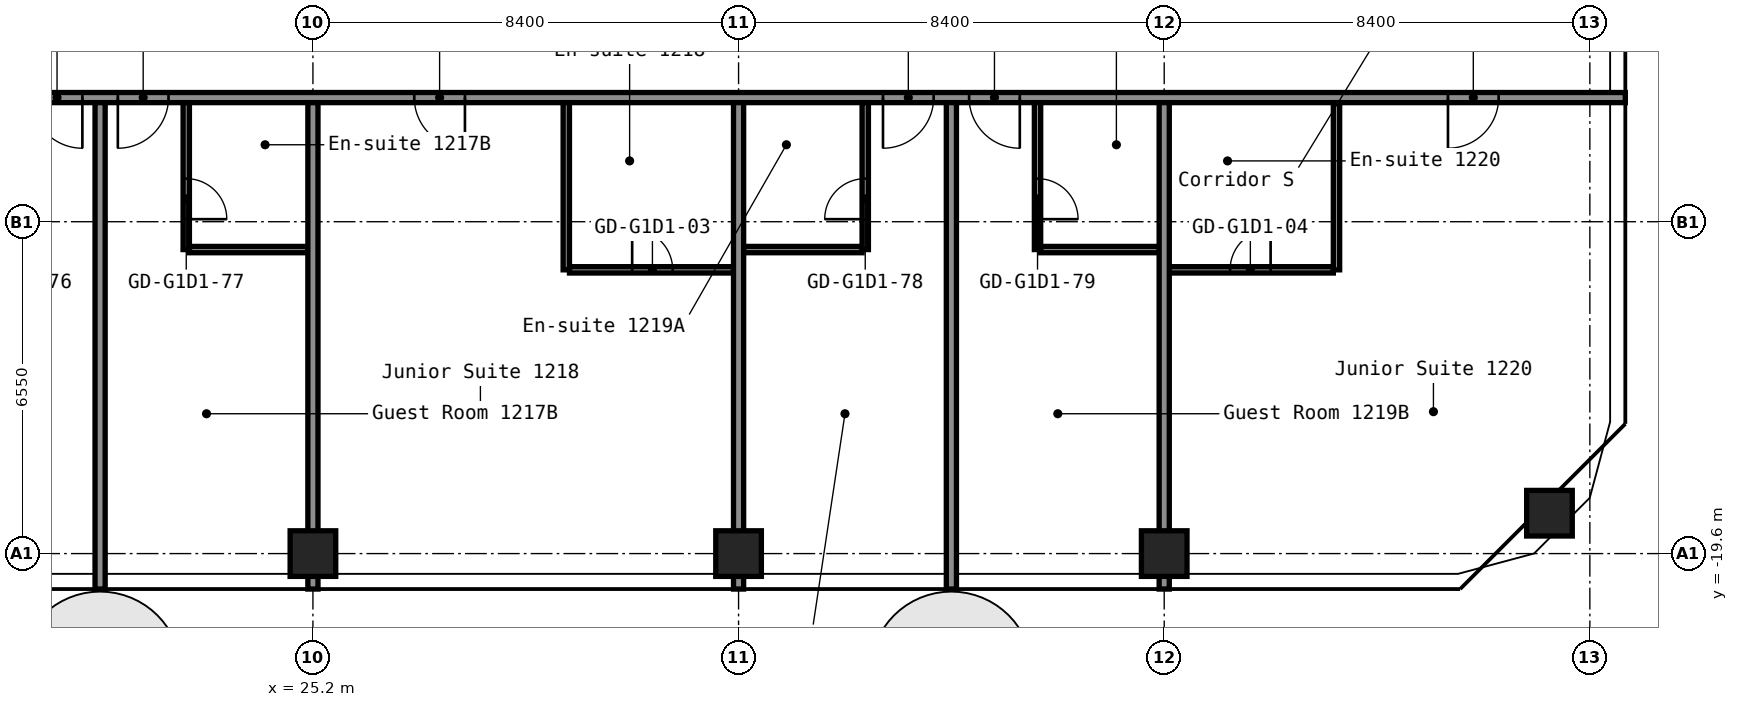
"""IFC4 building model, lengths in metres.
Left out: names, types, materials, properties, quantities, classifications, styles, units other than length and angle.
Written with IfcOpenShell. Run it as: python <this file> out.ifc"""

import sys

from ifc_helpers import new_model, si_unit, direction, frame, frame_2d, origin, origin_2d, place, context, subcontext, project, spatial, rectangle, hollow_rectangle, extrude, element, fill, save


model = new_model("IFC4")
c1 = context("Model", 3, precision=1e-05, world=origin(), true_north=direction((0.0, 1.0)))
c2 = subcontext(c1, "Body", "Model", "MODEL_VIEW")
j1 = project(units=[si_unit("LENGTHUNIT", "METRE"), si_unit("PLANEANGLEUNIT", "RADIAN")], contexts=[c1])
p1 = place(None, origin())
s1 = spatial("IfcSite", under=j1, at=p1, CompositionType="ELEMENT")
p2 = place(p1, origin())
s2 = spatial("IfcBuilding", under=s1, at=p2, CompositionType="ELEMENT")
p3 = place(p2, frame((0.0, 0.0, 45.4)))
s3 = spatial("IfcBuildingStorey", under=s2, at=p3, CompositionType="ELEMENT", Elevation=45.4)
for number, where, z_axis, x_axis in (
    (1, (25.2, -19.6, 0.0), (0.0, 0.0, 1.0), (1.0, 0.0, 0.0)),
    (2, (33.6, -19.6, 0.0), (0.0, 0.0, 1.0), (1.0, 0.0, 0.0)),
    (3, (42.0, -19.6, 0.0), (0.0, 0.0, 1.0), (1.0, 0.0, 0.0)),
    (4, (49.603, -18.803, 0.0), (0.0, 0.0, 1.0), (1.0, 0.0, 0.0)),
):
    element("IfcColumn", number, at=place(p3, frame(where, z_axis=z_axis, x_axis=x_axis)), inside=s3, PredefinedType="COLUMN", context=c2, shape_type="SweptSolid", body=[
        extrude(hollow_rectangle(XDim=0.9, YDim=0.9, WallThickness=0.036, at=origin_2d()), origin(), (0.0, 0.0, 1.0), 2.8),
    ])
p4 = place(p3, frame((30.262, -14.0, 0.0), z_axis=(0.0, 0.0, 1.0), x_axis=(1.0, 0.0, 0.0)))
e5 = element("IfcWall", 5, at=p4, inside=s3, PredefinedType="PARTITIONING", context=c2, shape_type="SweptSolid", body=[
    extrude(rectangle(XDim=3.238, YDim=0.125, at=frame_2d((1.619, 0.0))), origin(), (0.0, 0.0, 1.0), 2.8),
])
p5 = place(p4, frame((1.238, 0.0, 0.0)))
e6 = element("IfcOpeningElement", 6, at=p5, cuts=e5, PredefinedType="OPENING", context=c2, shape_type="SweptSolid", body=[
    extrude(rectangle(XDim=0.8, YDim=2.1, at=frame_2d((0.4, 1.05))), frame((0.0, 0.073, 0.0), z_axis=(0.0, -1.0, 0.0), x_axis=(1.0, 0.0, 0.0)), (0.0, 0.0, 1.0), 0.145),
])
p6 = place(p3, frame((42.1, -14.0, 0.0), z_axis=(0.0, 0.0, 1.0), x_axis=(1.0, 0.0, 0.0)))
e7 = element("IfcWall", 7, at=p6, inside=s3, PredefinedType="PARTITIONING", context=c2, shape_type="SweptSolid", body=[
    extrude(rectangle(XDim=3.237, YDim=0.125, at=frame_2d((1.619, 0.0))), origin(), (0.0, 0.0, 1.0), 2.8),
])
p7 = place(p6, frame((1.2, 0.0, 0.0)))
e8 = element("IfcOpeningElement", 8, at=p7, cuts=e7, PredefinedType="OPENING", context=c2, shape_type="SweptSolid", body=[
    extrude(rectangle(XDim=0.8, YDim=2.1, at=frame_2d((0.4, 1.05))), frame((0.0, 0.073, 0.0), z_axis=(0.0, -1.0, 0.0), x_axis=(1.0, 0.0, 0.0)), (0.0, 0.0, 1.0), 0.145),
])
for number, where, z_axis, x_axis in (
    (9, (22.762, -13.6, 0.0), (0.0, 0.0, 1.0), (1.0, 0.0, 0.0)),
    (10, (33.7, -13.6, 0.0), (0.0, 0.0, 1.0), (1.0, 0.0, 0.0)),
):
    element("IfcWall", number, at=place(p3, frame(where, z_axis=z_axis, x_axis=x_axis)), inside=s3, PredefinedType="PARTITIONING", context=c2, shape_type="SweptSolid", body=[
        extrude(rectangle(XDim=2.338, YDim=0.125, at=frame_2d((1.169, 0.0))), origin(), (0.0, 0.0, 1.0), 2.8),
    ])
p8 = place(p3, frame((39.562, -13.6, 0.0), z_axis=(0.0, 0.0, 1.0), x_axis=(1.0, 0.0, 0.0)))
e11 = element("IfcWall", 11, at=p8, inside=s3, PredefinedType="PARTITIONING", context=c2, shape_type="SweptSolid", body=[
    extrude(rectangle(XDim=2.337, YDim=0.125, at=frame_2d((1.169, 0.0))), origin(), (0.0, 0.0, 1.0), 2.8),
])
p9 = place(p3, frame((16.8, -10.6, 0.0), z_axis=(0.0, 0.0, 1.0), x_axis=(1.0, 0.0, 0.0)))
e12 = element("IfcWall", 12, at=p9, inside=s3, PredefinedType="PARTITIONING", context=c2, shape_type="SweptSolid", body=[
    extrude(rectangle(XDim=34.3, YDim=0.2, at=frame_2d((17.15, 0.0))), origin(), (0.0, 0.0, 1.0), 2.8),
])
p10 = place(p9, frame((2.85, 0.0, 0.0)))
e13 = element("IfcOpeningElement", 13, at=p10, cuts=e12, PredefinedType="OPENING", context=c2, shape_type="SweptSolid", body=[
    extrude(rectangle(XDim=1.0, YDim=2.1, at=frame_2d((0.5, 1.05))), frame((0.0, 0.11, 0.0), z_axis=(0.0, -1.0, 0.0), x_axis=(1.0, 0.0, 0.0)), (0.0, 0.0, 1.0), 0.22),
])
p11 = place(p9, frame((4.55, 0.0, 0.0)))
e14 = element("IfcOpeningElement", 14, at=p11, cuts=e12, PredefinedType="OPENING", context=c2, shape_type="SweptSolid", body=[
    extrude(rectangle(XDim=1.0, YDim=2.1, at=frame_2d((0.5, 1.05))), frame((0.0, 0.11, 0.0), z_axis=(0.0, -1.0, 0.0), x_axis=(1.0, 0.0, 0.0)), (0.0, 0.0, 1.0), 0.22),
])
p12 = place(p9, frame((10.4, 0.0, 0.0)))
e15 = element("IfcOpeningElement", 15, at=p12, cuts=e12, PredefinedType="OPENING", context=c2, shape_type="SweptSolid", body=[
    extrude(rectangle(XDim=1.0, YDim=2.1, at=frame_2d((0.5, 1.05))), frame((0.0, 0.11, 0.0), z_axis=(0.0, -1.0, 0.0), x_axis=(1.0, 0.0, 0.0)), (0.0, 0.0, 1.0), 0.22),
])
p13 = place(p9, frame((19.65, 0.0, 0.0)))
e16 = element("IfcOpeningElement", 16, at=p13, cuts=e12, PredefinedType="OPENING", context=c2, shape_type="SweptSolid", body=[
    extrude(rectangle(XDim=1.0, YDim=2.1, at=frame_2d((0.5, 1.05))), frame((0.0, 0.11, 0.0), z_axis=(0.0, -1.0, 0.0), x_axis=(1.0, 0.0, 0.0)), (0.0, 0.0, 1.0), 0.22),
])
p14 = place(p9, frame((21.35, 0.0, 0.0)))
e17 = element("IfcOpeningElement", 17, at=p14, cuts=e12, PredefinedType="OPENING", context=c2, shape_type="SweptSolid", body=[
    extrude(rectangle(XDim=1.0, YDim=2.1, at=frame_2d((0.5, 1.05))), frame((0.0, 0.11, 0.0), z_axis=(0.0, -1.0, 0.0), x_axis=(1.0, 0.0, 0.0)), (0.0, 0.0, 1.0), 0.22),
])
p15 = place(p9, frame((30.8, 0.0, 0.0)))
e18 = element("IfcOpeningElement", 18, at=p15, cuts=e12, PredefinedType="OPENING", context=c2, shape_type="SweptSolid", body=[
    extrude(rectangle(XDim=1.0, YDim=2.1, at=frame_2d((0.5, 1.05))), frame((0.0, 0.11, 0.0), z_axis=(0.0, -1.0, 0.0), x_axis=(1.0, 0.0, 0.0)), (0.0, 0.0, 1.0), 0.22),
])
p16 = place(p3, frame((21.0, -20.3, 0.0), z_axis=(0.0, 0.0, 1.0), x_axis=(0.0, 1.0, 0.0)))
e19 = element("IfcWall", 19, at=p16, inside=s3, PredefinedType="PARTITIONING", context=c2, shape_type="SweptSolid", body=[
    extrude(rectangle(XDim=9.6, YDim=0.2, at=frame_2d((4.8, 0.0))), origin(), (0.0, 0.0, 1.0), 2.8),
])
p17 = place(p3, frame((22.7, -13.6, 0.0), z_axis=(0.0, 0.0, 1.0), x_axis=(0.0, 1.0, 0.0)))
e20 = element("IfcWall", 20, at=p17, inside=s3, PredefinedType="PARTITIONING", context=c2, shape_type="SweptSolid", body=[
    extrude(rectangle(XDim=2.9, YDim=0.125, at=frame_2d((1.45, 0.0))), origin(), (0.0, 0.0, 1.0), 2.8),
])
p18 = place(p17, frame((0.6, 0.0, 0.0)))
e21 = element("IfcOpeningElement", 21, at=p18, cuts=e20, PredefinedType="OPENING", context=c2, shape_type="SweptSolid", body=[
    extrude(rectangle(XDim=0.8, YDim=2.1, at=frame_2d((0.4, 1.05))), frame((0.0, 0.073, 0.0), z_axis=(0.0, -1.0, 0.0), x_axis=(1.0, 0.0, 0.0)), (0.0, 0.0, 1.0), 0.145),
])
p19 = place(p3, frame((25.2, -20.3, 0.0), z_axis=(0.0, 0.0, 1.0), x_axis=(0.0, 1.0, 0.0)))
e22 = element("IfcWall", 22, at=p19, inside=s3, PredefinedType="PARTITIONING", context=c2, shape_type="SweptSolid", body=[
    extrude(rectangle(XDim=9.6, YDim=0.2, at=frame_2d((4.8, 0.0))), origin(), (0.0, 0.0, 1.0), 2.8),
])
p20 = place(p3, frame((30.2, -14.0, 0.0), z_axis=(0.0, 0.0, 1.0), x_axis=(0.0, 1.0, 0.0)))
e23 = element("IfcWall", 23, at=p20, inside=s3, PredefinedType="PARTITIONING", context=c2, shape_type="SweptSolid", body=[
    extrude(rectangle(XDim=3.3, YDim=0.125, at=frame_2d((1.65, 0.0))), origin(), (0.0, 0.0, 1.0), 2.8),
])
p21 = place(p3, frame((33.6, -20.3, 0.0), z_axis=(0.0, 0.0, 1.0), x_axis=(0.0, 1.0, 0.0)))
e24 = element("IfcWall", 24, at=p21, inside=s3, PredefinedType="PARTITIONING", context=c2, shape_type="SweptSolid", body=[
    extrude(rectangle(XDim=9.6, YDim=0.2, at=frame_2d((4.8, 0.0))), origin(), (0.0, 0.0, 1.0), 2.8),
])
p22 = place(p3, frame((36.1, -13.6, 0.0), z_axis=(0.0, 0.0, 1.0), x_axis=(0.0, 1.0, 0.0)))
e25 = element("IfcWall", 25, at=p22, inside=s3, PredefinedType="PARTITIONING", context=c2, shape_type="SweptSolid", body=[
    extrude(rectangle(XDim=2.9, YDim=0.125, at=frame_2d((1.45, 0.0))), origin(), (0.0, 0.0, 1.0), 2.8),
])
p23 = place(p22, frame((0.6, 0.0, 0.0)))
e26 = element("IfcOpeningElement", 26, at=p23, cuts=e25, PredefinedType="OPENING", context=c2, shape_type="SweptSolid", body=[
    extrude(rectangle(XDim=0.8, YDim=2.1, at=frame_2d((0.4, 1.05))), frame((0.0, 0.073, 0.0), z_axis=(0.0, -1.0, 0.0), x_axis=(1.0, 0.0, 0.0)), (0.0, 0.0, 1.0), 0.145),
])
p24 = place(p3, frame((37.8, -20.3, 0.0), z_axis=(0.0, 0.0, 1.0), x_axis=(0.0, 1.0, 0.0)))
e27 = element("IfcWall", 27, at=p24, inside=s3, PredefinedType="PARTITIONING", context=c2, shape_type="SweptSolid", body=[
    extrude(rectangle(XDim=9.6, YDim=0.2, at=frame_2d((4.8, 0.0))), origin(), (0.0, 0.0, 1.0), 2.8),
])
p25 = place(p3, frame((39.5, -13.6, 0.0), z_axis=(0.0, 0.0, 1.0), x_axis=(0.0, 1.0, 0.0)))
e28 = element("IfcWall", 28, at=p25, inside=s3, PredefinedType="PARTITIONING", context=c2, shape_type="SweptSolid", body=[
    extrude(rectangle(XDim=2.9, YDim=0.125, at=frame_2d((1.45, 0.0))), origin(), (0.0, 0.0, 1.0), 2.8),
])
p26 = place(p25, frame((0.6, 0.0, 0.0)))
e29 = element("IfcOpeningElement", 29, at=p26, cuts=e28, PredefinedType="OPENING", context=c2, shape_type="SweptSolid", body=[
    extrude(rectangle(XDim=0.8, YDim=2.1, at=frame_2d((0.4, 1.05))), frame((0.0, 0.073, 0.0), z_axis=(0.0, -1.0, 0.0), x_axis=(1.0, 0.0, 0.0)), (0.0, 0.0, 1.0), 0.145),
])
p27 = place(p3, frame((42.0, -20.3, 0.0), z_axis=(0.0, 0.0, 1.0), x_axis=(0.0, 1.0, 0.0)))
e30 = element("IfcWall", 30, at=p27, inside=s3, PredefinedType="PARTITIONING", context=c2, shape_type="SweptSolid", body=[
    extrude(rectangle(XDim=9.6, YDim=0.2, at=frame_2d((4.8, 0.0))), origin(), (0.0, 0.0, 1.0), 2.8),
])
p28 = place(p3, frame((45.4, -14.0, 0.0), z_axis=(0.0, 0.0, 1.0), x_axis=(0.0, 1.0, 0.0)))
e31 = element("IfcWall", 31, at=p28, inside=s3, PredefinedType="PARTITIONING", context=c2, shape_type="SweptSolid", body=[
    extrude(rectangle(XDim=3.3, YDim=0.125, at=frame_2d((1.65, 0.0))), origin(), (0.0, 0.0, 1.0), 2.8),
])
p29 = place(p5, origin())
e32 = element("IfcDoor", 32, at=p29, inside=s3, OperationType="SINGLE_SWING_RIGHT", PredefinedType="DOOR", context=c2, shape_type="SweptSolid", body=[
    extrude(rectangle(XDim=0.8, YDim=2.1, at=frame_2d((0.4, 1.05))), frame((0.0, 0.025, 0.0), z_axis=(0.0, -1.0, 0.0), x_axis=(1.0, 0.0, 0.0)), (0.0, 0.0, 1.0), 0.05),
])
fill(e6, e32)
p30 = place(p7, origin())
e33 = element("IfcDoor", 33, at=p30, inside=s3, OperationType="SINGLE_SWING_LEFT", PredefinedType="DOOR", context=c2, shape_type="SweptSolid", body=[
    extrude(rectangle(XDim=0.8, YDim=2.1, at=frame_2d((0.4, 1.05))), frame((0.0, 0.025, 0.0), z_axis=(0.0, -1.0, 0.0), x_axis=(1.0, 0.0, 0.0)), (0.0, 0.0, 1.0), 0.05),
])
fill(e8, e33)
p31 = place(p10, origin())
e34 = element("IfcDoor", 34, at=p31, inside=s3, OperationType="SINGLE_SWING_RIGHT", PredefinedType="DOOR", context=c2, shape_type="SweptSolid", body=[
    extrude(rectangle(XDim=1.0, YDim=2.1, at=frame_2d((0.5, 1.05))), frame((0.0, 0.025, 0.0), z_axis=(0.0, -1.0, 0.0), x_axis=(1.0, 0.0, 0.0)), (0.0, 0.0, 1.0), 0.05),
])
fill(e13, e34)
p32 = place(p11, origin())
e35 = element("IfcDoor", 35, at=p32, inside=s3, OperationType="SINGLE_SWING_LEFT", PredefinedType="DOOR", context=c2, shape_type="SweptSolid", body=[
    extrude(rectangle(XDim=1.0, YDim=2.1, at=frame_2d((0.5, 1.05))), frame((0.0, 0.025, 0.0), z_axis=(0.0, -1.0, 0.0), x_axis=(1.0, 0.0, 0.0)), (0.0, 0.0, 1.0), 0.05),
])
fill(e14, e35)
p33 = place(p12, origin())
e36 = element("IfcDoor", 36, at=p33, inside=s3, OperationType="SINGLE_SWING_RIGHT", PredefinedType="DOOR", context=c2, shape_type="SweptSolid", body=[
    extrude(rectangle(XDim=1.0, YDim=2.1, at=frame_2d((0.5, 1.05))), frame((0.0, 0.025, 0.0), z_axis=(0.0, -1.0, 0.0), x_axis=(1.0, 0.0, 0.0)), (0.0, 0.0, 1.0), 0.05),
])
fill(e15, e36)
p34 = place(p13, origin())
e37 = element("IfcDoor", 37, at=p34, inside=s3, OperationType="SINGLE_SWING_LEFT", PredefinedType="DOOR", context=c2, shape_type="SweptSolid", body=[
    extrude(rectangle(XDim=1.0, YDim=2.1, at=frame_2d((0.5, 1.05))), frame((0.0, 0.025, 0.0), z_axis=(0.0, -1.0, 0.0), x_axis=(1.0, 0.0, 0.0)), (0.0, 0.0, 1.0), 0.05),
])
fill(e16, e37)
p35 = place(p14, origin())
e38 = element("IfcDoor", 38, at=p35, inside=s3, OperationType="SINGLE_SWING_RIGHT", PredefinedType="DOOR", context=c2, shape_type="SweptSolid", body=[
    extrude(rectangle(XDim=1.0, YDim=2.1, at=frame_2d((0.5, 1.05))), frame((0.0, 0.025, 0.0), z_axis=(0.0, -1.0, 0.0), x_axis=(1.0, 0.0, 0.0)), (0.0, 0.0, 1.0), 0.05),
])
fill(e17, e38)
p36 = place(p15, origin())
e39 = element("IfcDoor", 39, at=p36, inside=s3, OperationType="SINGLE_SWING_LEFT", PredefinedType="DOOR", context=c2, shape_type="SweptSolid", body=[
    extrude(rectangle(XDim=1.0, YDim=2.1, at=frame_2d((0.5, 1.05))), frame((0.0, 0.025, 0.0), z_axis=(0.0, -1.0, 0.0), x_axis=(1.0, 0.0, 0.0)), (0.0, 0.0, 1.0), 0.05),
])
fill(e18, e39)
p37 = place(p18, origin())
e40 = element("IfcDoor", 40, at=p37, inside=s3, OperationType="SINGLE_SWING_LEFT", PredefinedType="DOOR", context=c2, shape_type="SweptSolid", body=[
    extrude(rectangle(XDim=0.8, YDim=2.1, at=frame_2d((0.4, 1.05))), frame((0.0, 0.025, 0.0), z_axis=(0.0, -1.0, 0.0), x_axis=(1.0, 0.0, 0.0)), (0.0, 0.0, 1.0), 0.05),
])
fill(e21, e40)
p38 = place(p23, origin())
e41 = element("IfcDoor", 41, at=p38, inside=s3, OperationType="SINGLE_SWING_RIGHT", PredefinedType="DOOR", context=c2, shape_type="SweptSolid", body=[
    extrude(rectangle(XDim=0.8, YDim=2.1, at=frame_2d((0.4, 1.05))), frame((0.0, 0.025, 0.0), z_axis=(0.0, -1.0, 0.0), x_axis=(1.0, 0.0, 0.0)), (0.0, 0.0, 1.0), 0.05),
])
fill(e26, e41)
p39 = place(p26, origin())
e42 = element("IfcDoor", 42, at=p39, inside=s3, OperationType="SINGLE_SWING_LEFT", PredefinedType="DOOR", context=c2, shape_type="SweptSolid", body=[
    extrude(rectangle(XDim=0.8, YDim=2.1, at=frame_2d((0.4, 1.05))), frame((0.0, 0.025, 0.0), z_axis=(0.0, -1.0, 0.0), x_axis=(1.0, 0.0, 0.0)), (0.0, 0.0, 1.0), 0.05),
])
fill(e29, e42)
save(model, sys.argv[1])
